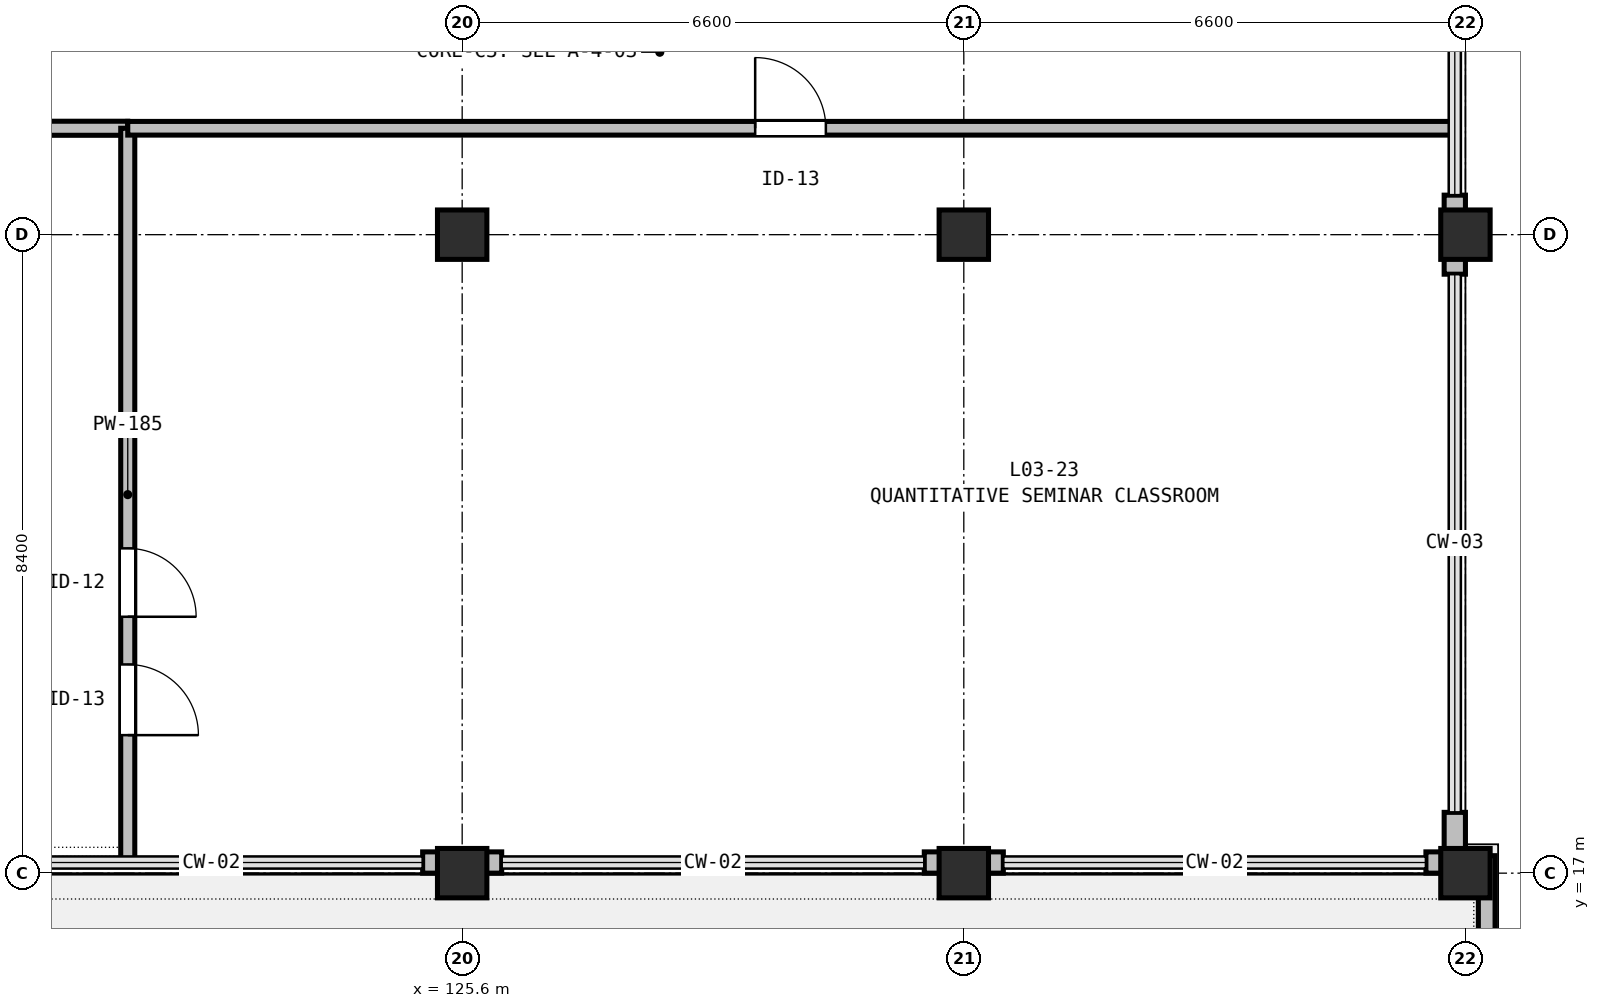
"""IFC4 building model, lengths in metres.
Left out: names, types, materials, properties, quantities, classifications, styles, units other than length and angle.
Written with IfcOpenShell. Run it as: python <this file> out.ifc"""

import sys

from ifc_helpers import new_model, si_unit, direction, frame, frame_2d, origin, origin_2d, place, context, subcontext, project, spatial, rectangle, extrude, element, fill, save


model = new_model("IFC4")
c1 = context("Model", 3, precision=1e-05, world=origin(), true_north=direction((0.0, 1.0)))
c2 = subcontext(c1, "Body", "Model", "MODEL_VIEW")
j1 = project(units=[si_unit("LENGTHUNIT", "METRE"), si_unit("PLANEANGLEUNIT", "RADIAN")], contexts=[c1])
p1 = place(None, origin())
s1 = spatial("IfcSite", under=j1, at=p1, CompositionType="ELEMENT")
p2 = place(p1, origin())
s2 = spatial("IfcBuilding", under=s1, at=p2, CompositionType="ELEMENT")
p3 = place(p2, frame((0.0, 0.0, 15.0)))
s3 = spatial("IfcBuildingStorey", under=s2, at=p3, CompositionType="ELEMENT", Elevation=15.0)
for number, where, z_axis, x_axis in (
    (1, (125.6, 17.0, 0.0), (0.0, 0.0, 1.0), (1.0, 0.0, 0.0)),
    (2, (125.6, 25.4, 0.0), (0.0, 0.0, 1.0), (1.0, 0.0, 0.0)),
    (3, (132.2, 17.0, 0.0), (0.0, 0.0, 1.0), (1.0, 0.0, 0.0)),
    (4, (132.2, 25.4, 0.0), (0.0, 0.0, 1.0), (1.0, 0.0, 0.0)),
    (5, (138.8, 17.0, 0.0), (0.0, 0.0, 1.0), (1.0, 0.0, 0.0)),
    (6, (138.8, 25.4, 0.0), (0.0, 0.0, 1.0), (1.0, 0.0, 0.0)),
):
    element("IfcColumn", number, at=place(p3, frame(where, z_axis=z_axis, x_axis=x_axis)), inside=s3, PredefinedType="COLUMN", context=c2, shape_type="SweptSolid", body=[
        extrude(rectangle(XDim=0.65, YDim=0.65, at=origin_2d()), origin(), (0.0, 0.0, 1.0), 4.5),
    ])
for number, where, z_axis, x_axis in (
    (7, (138.66, 25.92, 0.0), (0.0, 0.0, 1.0), (0.0, -1.0, 0.0)),
    (8, (138.66, 25.4, 0.0), (0.0, 0.0, 1.0), (0.0, -1.0, 0.0)),
    (9, (138.66, 17.8, 0.0), (0.0, 0.0, 1.0), (0.0, -1.0, 0.0)),
    (10, (138.8, 17.14, 0.0), (0.0, 0.0, 1.0), (-1.0, 0.0, 0.0)),
    (11, (132.72, 17.14, 0.0), (0.0, 0.0, 1.0), (-1.0, 0.0, 0.0)),
    (12, (132.2, 17.14, 0.0), (0.0, 0.0, 1.0), (-1.0, 0.0, 0.0)),
    (13, (126.12, 17.14, 0.0), (0.0, 0.0, 1.0), (-1.0, 0.0, 0.0)),
    (14, (125.6, 17.14, 0.0), (0.0, 0.0, 1.0), (-1.0, 0.0, 0.0)),
):
    element("IfcWall", number, at=place(p3, frame(where, z_axis=z_axis, x_axis=x_axis)), inside=s3, PredefinedType="STANDARD", context=c2, shape_type="SweptSolid", body=[
        extrude(rectangle(XDim=0.52, YDim=0.28, at=frame_2d((0.26, 0.0))), origin(), (0.0, 0.0, 1.0), 3.735),
    ])
p4 = place(p3, frame((139.08, 17.23, 0.0), z_axis=(0.0, 0.0, 1.0), x_axis=(0.0, -1.0, 0.0)))
e15 = element("IfcWall", 15, at=p4, inside=s3, PredefinedType="PARAPET", context=c2, shape_type="SweptSolid", body=[
    extrude(rectangle(XDim=8.91, YDim=0.22, at=frame_2d((4.455, 0.0))), origin(), (0.0, 0.0, 1.0), 0.68),
])
p5 = place(p3, frame((106.082, 26.8, 0.0), z_axis=(0.0, 0.0, 1.0), x_axis=(1.0, 0.0, 0.0)))
e16 = element("IfcWall", 16, at=p5, inside=s3, PredefinedType="PARTITIONING", context=c2, shape_type="SweptSolid", body=[
    extrude(rectangle(XDim=15.118, YDim=0.185, at=frame_2d((7.559, 0.0))), origin(), (0.0, 0.0, 1.0), 3.735),
])
p6 = place(p5, frame((7.109, 0.0, 0.0)))
e17 = element("IfcOpeningElement", 17, at=p6, cuts=e16, PredefinedType="OPENING", context=c2, shape_type="SweptSolid", body=[
    extrude(rectangle(XDim=0.9, YDim=2.1, at=frame_2d((0.45, 1.05))), frame((0.0, 0.103, 0.0), z_axis=(0.0, -1.0, 0.0), x_axis=(1.0, 0.0, 0.0)), (0.0, 0.0, 1.0), 0.205),
])
p7 = place(p3, frame((121.2, 26.8, 0.0), z_axis=(0.0, 0.0, 1.0), x_axis=(0.0, -1.0, 0.0)))
e18 = element("IfcWall", 18, at=p7, inside=s3, PredefinedType="PARTITIONING", context=c2, shape_type="SweptSolid", body=[
    extrude(rectangle(XDim=9.64, YDim=0.185, at=frame_2d((4.82, 0.0))), origin(), (0.0, 0.0, 1.0), 3.735),
])
p8 = place(p7, frame((5.527, 0.0, 0.0)))
e19 = element("IfcOpeningElement", 19, at=p8, cuts=e18, PredefinedType="OPENING", context=c2, shape_type="SweptSolid", body=[
    extrude(rectangle(XDim=0.9, YDim=2.1, at=frame_2d((0.45, 1.05))), frame((0.0, 0.103, 0.0), z_axis=(0.0, -1.0, 0.0), x_axis=(1.0, 0.0, 0.0)), (0.0, 0.0, 1.0), 0.205),
])
p9 = place(p7, frame((7.054, 0.0, 0.0)))
e20 = element("IfcOpeningElement", 20, at=p9, cuts=e18, PredefinedType="OPENING", context=c2, shape_type="SweptSolid", body=[
    extrude(rectangle(XDim=0.93, YDim=2.1, at=frame_2d((0.465, 1.05))), frame((0.0, 0.103, 0.0), z_axis=(0.0, -1.0, 0.0), x_axis=(1.0, 0.0, 0.0)), (0.0, 0.0, 1.0), 0.205),
])
p10 = place(p3, frame((121.2, 26.8, 0.0), z_axis=(0.0, 0.0, 1.0), x_axis=(1.0, 0.0, 0.0)))
e21 = element("IfcWall", 21, at=p10, inside=s3, PredefinedType="PARTITIONING", context=c2, shape_type="SweptSolid", body=[
    extrude(rectangle(XDim=17.44, YDim=0.18, at=frame_2d((8.72, 0.0))), origin(), (0.0, 0.0, 1.0), 3.735),
])
p11 = place(p10, frame((8.255, 0.0, 0.0)))
e22 = element("IfcOpeningElement", 22, at=p11, cuts=e21, PredefinedType="OPENING", context=c2, shape_type="SweptSolid", body=[
    extrude(rectangle(XDim=0.93, YDim=2.1, at=frame_2d((0.465, 1.05))), frame((0.0, 0.1, 0.0), z_axis=(0.0, -1.0, 0.0), x_axis=(1.0, 0.0, 0.0)), (0.0, 0.0, 1.0), 0.2),
])
p12 = place(p8, origin())
e23 = element("IfcDoor", 23, at=p12, inside=s3, OperationType="SINGLE_SWING_RIGHT", PredefinedType="DOOR", context=c2, shape_type="SweptSolid", body=[
    extrude(rectangle(XDim=0.9, YDim=2.1, at=frame_2d((0.45, 1.05))), frame((0.0, 0.025, 0.0), z_axis=(0.0, -1.0, 0.0), x_axis=(1.0, 0.0, 0.0)), (0.0, 0.0, 1.0), 0.05),
])
fill(e19, e23)
p13 = place(p11, origin())
e24 = element("IfcDoor", 24, at=p13, inside=s3, OperationType="SINGLE_SWING_LEFT", PredefinedType="DOOR", context=c2, shape_type="SweptSolid", body=[
    extrude(rectangle(XDim=0.93, YDim=2.1, at=frame_2d((0.465, 1.05))), frame((0.0, 0.025, 0.0), z_axis=(0.0, -1.0, 0.0), x_axis=(1.0, 0.0, 0.0)), (0.0, 0.0, 1.0), 0.05),
])
fill(e22, e24)
p14 = place(p9, origin())
e25 = element("IfcDoor", 25, at=p14, inside=s3, OperationType="SINGLE_SWING_RIGHT", PredefinedType="DOOR", context=c2, shape_type="SweptSolid", body=[
    extrude(rectangle(XDim=0.93, YDim=2.1, at=frame_2d((0.465, 1.05))), frame((0.0, 0.025, 0.0), z_axis=(0.0, -1.0, 0.0), x_axis=(1.0, 0.0, 0.0)), (0.0, 0.0, 1.0), 0.05),
])
fill(e20, e25)
save(model, sys.argv[1])
